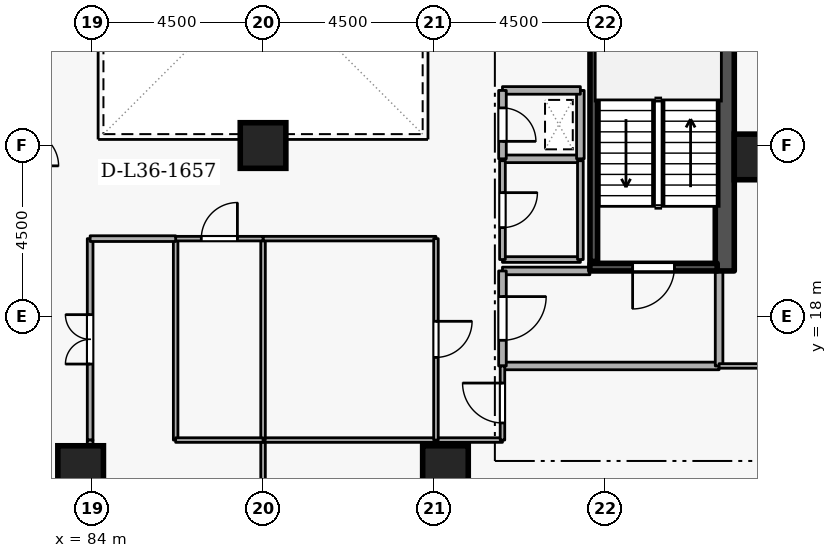
"""IFC4 building model, lengths in metres.
Left out: names, types, materials, properties, quantities, classifications, styles, units other than length and angle.
Written with IfcOpenShell. Run it as: python <this file> out.ifc"""

import sys

from ifc_helpers import new_model, si_unit, direction, frame, frame_2d, origin, origin_2d, place, context, subcontext, project, spatial, rectangle, extrude, element, fill, save


model = new_model("IFC4")
c1 = context("Model", 3, precision=1e-05, world=origin(), true_north=direction((0.0, 1.0)))
c2 = subcontext(c1, "Body", "Model", "MODEL_VIEW")
j1 = project(units=[si_unit("LENGTHUNIT", "METRE"), si_unit("PLANEANGLEUNIT", "RADIAN")], contexts=[c1])
p1 = place(None, origin())
s1 = spatial("IfcSite", under=j1, at=p1, CompositionType="ELEMENT")
p2 = place(p1, origin())
s2 = spatial("IfcBuilding", under=s1, at=p2, CompositionType="ELEMENT")
p3 = place(p2, frame((0.0, 0.0, 137.7)))
s3 = spatial("IfcBuildingStorey", under=s2, at=p3, CompositionType="ELEMENT", Elevation=137.7)
p4 = place(p3, frame((100.65, 19.2, 0.0), z_axis=(0.0, 0.0, 1.0), x_axis=(0.0, 1.0, 0.0)))
e1 = element("IfcWall", 1, at=p4, inside=s3, PredefinedType="SHEAR", context=c2, shape_type="SweptSolid", body=[
    extrude(rectangle(XDim=15.6, YDim=0.5, at=frame_2d((7.8, 0.0))), origin(), (0.0, 0.0, 1.0), 3.6),
])
for number, where, z_axis, x_axis in (
    (2, (93.3, 14.0, 0.0), (0.0, 0.0, 1.0), (1.0, 0.0, 0.0)),
    (3, (83.7, 14.0, 0.0), (0.0, 0.0, 1.0), (1.0, 0.0, 0.0)),
    (4, (101.5, 22.2, 0.0), (0.0, 0.0, 1.0), (1.0, 0.0, 0.0)),
    (5, (88.5, 22.5, 0.0), (0.0, 0.0, 1.0), (1.0, 0.0, 0.0)),
):
    element("IfcColumn", number, at=place(p3, frame(where, z_axis=z_axis, x_axis=x_axis)), inside=s3, PredefinedType="COLUMN", context=c2, shape_type="SweptSolid", body=[
        extrude(rectangle(XDim=1.2, YDim=1.2, at=origin_2d()), origin(), (0.0, 0.0, 1.0), 3.6),
    ])
p5 = place(p3, frame((100.45, 19.3, 0.0), z_axis=(0.0, 0.0, 1.0), x_axis=(-1.0, 0.0, 0.0)))
e6 = element("IfcWall", 6, at=p5, inside=s3, PredefinedType="SHEAR", context=c2, shape_type="SweptSolid", body=[
    extrude(rectangle(XDim=3.35, YDim=0.2, at=frame_2d((1.675, 0.0))), origin(), (0.0, 0.0, 1.0), 3.6),
])
p6 = place(p5, frame((1.125, 0.0, 0.0)))
e7 = element("IfcOpeningElement", 7, at=p6, cuts=e6, PredefinedType="OPENING", context=c2, shape_type="SweptSolid", body=[
    extrude(rectangle(XDim=1.1, YDim=2.1, at=frame_2d((0.55, 1.05))), frame((0.0, 0.11, 0.0), z_axis=(0.0, -1.0, 0.0), x_axis=(1.0, 0.0, 0.0)), (0.0, 0.0, 1.0), 0.22),
])
p7 = place(p3, frame((97.203, 26.55, 0.0), z_axis=(0.0, 0.0, 1.0), x_axis=(0.0, -1.0, 0.0)))
e8 = element("IfcWall", 8, at=p7, inside=s3, PredefinedType="SHEAR", context=c2, shape_type="SweptSolid", body=[
    extrude(rectangle(XDim=7.1, YDim=0.2, at=frame_2d((3.55, 0.0))), origin(), (0.0, 0.0, 1.0), 3.6),
])
p8 = place(p3, frame((94.8, 16.7, 0.0), z_axis=(0.0, 0.0, 1.0), x_axis=(1.0, 0.0, 0.0)))
e9 = element("IfcWall", 9, at=p8, inside=s3, PredefinedType="STANDARD", context=c2, shape_type="SweptSolid", body=[
    extrude(rectangle(XDim=5.7, YDim=0.2, at=frame_2d((2.85, 0.0))), origin(), (0.0, 0.0, 1.0), 3.26),
])
p9 = place(p3, frame((100.5, 16.7, 0.0), z_axis=(0.0, 0.0, 1.0), x_axis=(0.0, 1.0, 0.0)))
e10 = element("IfcWall", 10, at=p9, inside=s3, PredefinedType="STANDARD", context=c2, shape_type="SweptSolid", body=[
    extrude(rectangle(XDim=2.5, YDim=0.2, at=frame_2d((1.25, 0.0))), origin(), (0.0, 0.0, 1.0), 3.26),
])
p10 = place(p3, frame((97.1, 19.2, 0.0), z_axis=(0.0, 0.0, 1.0), x_axis=(-1.0, 0.0, 0.0)))
e11 = element("IfcWall", 11, at=p10, inside=s3, PredefinedType="STANDARD", context=c2, shape_type="SweptSolid", body=[
    extrude(rectangle(XDim=2.3, YDim=0.2, at=frame_2d((1.15, 0.0))), origin(), (0.0, 0.0, 1.0), 2.465),
])
p11 = place(p3, frame((94.8, 19.2, 0.0), z_axis=(0.0, 0.0, 1.0), x_axis=(0.0, -1.0, 0.0)))
e12 = element("IfcWall", 12, at=p11, inside=s3, PredefinedType="STANDARD", context=c2, shape_type="SweptSolid", body=[
    extrude(rectangle(XDim=2.5, YDim=0.2, at=frame_2d((1.25, 0.0))), origin(), (0.0, 0.0, 1.0), 3.26),
])
p12 = place(p11, frame((0.675, 0.0, 0.0)))
e13 = element("IfcOpeningElement", 13, at=p12, cuts=e12, PredefinedType="OPENING", context=c2, shape_type="SweptSolid", body=[
    extrude(rectangle(XDim=1.15, YDim=2.1, at=frame_2d((0.575, 1.05))), frame((0.0, 0.11, 0.0), z_axis=(0.0, -1.0, 0.0), x_axis=(1.0, 0.0, 0.0)), (0.0, 0.0, 1.0), 0.22),
])
p13 = place(p3, frame((94.8, 22.15, 0.0), z_axis=(0.0, 0.0, 1.0), x_axis=(1.0, 0.0, 0.0)))
e14 = element("IfcWall", 14, at=p13, inside=s3, PredefinedType="STANDARD", context=c2, shape_type="SweptSolid", body=[
    extrude(rectangle(XDim=2.05, YDim=0.2, at=frame_2d((1.025, 0.0))), origin(), (0.0, 0.0, 1.0), 3.26),
])
p14 = place(p3, frame((96.85, 22.15, 0.0), z_axis=(0.0, 0.0, 1.0), x_axis=(0.0, 1.0, 0.0)))
e15 = element("IfcWall", 15, at=p14, inside=s3, PredefinedType="STANDARD", context=c2, shape_type="SweptSolid", body=[
    extrude(rectangle(XDim=1.8, YDim=0.2, at=frame_2d((0.9, 0.0))), origin(), (0.0, 0.0, 1.0), 3.26),
])
p15 = place(p3, frame((96.85, 23.95, 0.0), z_axis=(0.0, 0.0, 1.0), x_axis=(-1.0, 0.0, 0.0)))
e16 = element("IfcWall", 16, at=p15, inside=s3, PredefinedType="STANDARD", context=c2, shape_type="SweptSolid", body=[
    extrude(rectangle(XDim=2.05, YDim=0.2, at=frame_2d((1.025, 0.0))), origin(), (0.0, 0.0, 1.0), 3.26),
])
p16 = place(p3, frame((94.8, 23.95, 0.0), z_axis=(0.0, 0.0, 1.0), x_axis=(0.0, -1.0, 0.0)))
e17 = element("IfcWall", 17, at=p16, inside=s3, PredefinedType="STANDARD", context=c2, shape_type="SweptSolid", body=[
    extrude(rectangle(XDim=1.8, YDim=0.2, at=frame_2d((0.9, 0.0))), origin(), (0.0, 0.0, 1.0), 3.26),
])
p17 = place(p16, frame((0.46, 0.0, 0.0)))
e18 = element("IfcOpeningElement", 18, at=p17, cuts=e17, PredefinedType="OPENING", context=c2, shape_type="SweptSolid", body=[
    extrude(rectangle(XDim=0.88, YDim=2.04, at=frame_2d((0.44, 1.02))), frame((0.0, 0.11, 0.0), z_axis=(0.0, -1.0, 0.0), x_axis=(1.0, 0.0, 0.0)), (0.0, 0.0, 1.0), 0.22),
])
p18 = place(p3, frame((94.8, 19.5, 0.0), z_axis=(0.0, 0.0, 1.0), x_axis=(1.0, 0.0, 0.0)))
e19 = element("IfcWall", 19, at=p18, inside=s3, PredefinedType="PARTITIONING", context=c2, shape_type="SweptSolid", body=[
    extrude(rectangle(XDim=2.05, YDim=0.15, at=frame_2d((1.025, 0.0))), origin(), (0.0, 0.0, 1.0), 2.465),
])
p19 = place(p3, frame((96.85, 19.5, 0.0), z_axis=(0.0, 0.0, 1.0), x_axis=(0.0, 1.0, 0.0)))
e20 = element("IfcWall", 20, at=p19, inside=s3, PredefinedType="PARTITIONING", context=c2, shape_type="SweptSolid", body=[
    extrude(rectangle(XDim=2.6, YDim=0.15, at=frame_2d((1.3, 0.0))), origin(), (0.0, 0.0, 1.0), 3.26),
])
p20 = place(p3, frame((94.8, 22.1, 0.0), z_axis=(0.0, 0.0, 1.0), x_axis=(0.0, -1.0, 0.0)))
e21 = element("IfcWall", 21, at=p20, inside=s3, PredefinedType="PARTITIONING", context=c2, shape_type="SweptSolid", body=[
    extrude(rectangle(XDim=2.6, YDim=0.15, at=frame_2d((1.3, 0.0))), origin(), (0.0, 0.0, 1.0), 3.26),
])
p21 = place(p20, frame((0.84, 0.0, 0.0)))
e22 = element("IfcOpeningElement", 22, at=p21, cuts=e21, PredefinedType="OPENING", context=c2, shape_type="SweptSolid", body=[
    extrude(rectangle(XDim=0.92, YDim=2.08, at=frame_2d((0.46, 1.04))), frame((0.0, 0.085, 0.0), z_axis=(0.0, -1.0, 0.0), x_axis=(1.0, 0.0, 0.0)), (0.0, 0.0, 1.0), 0.17),
])
p22 = place(p3, frame((88.5, 3.28, 0.0), z_axis=(0.0, 0.0, 1.0), x_axis=(0.0, 1.0, 0.0)))
e23 = element("IfcWall", 23, at=p22, inside=s3, PredefinedType="PARTITIONING", context=c2, shape_type="SweptSolid", body=[
    extrude(rectangle(XDim=11.47, YDim=0.12, at=frame_2d((5.735, 0.0))), origin(), (0.0, 0.0, 1.0), 2.802),
])
p23 = place(p3, frame((88.5, 14.75, 0.0), z_axis=(0.0, 0.0, 1.0), x_axis=(1.0, 0.0, 0.0)))
e24 = element("IfcWall", 24, at=p23, inside=s3, PredefinedType="PARTITIONING", context=c2, shape_type="SweptSolid", body=[
    extrude(rectangle(XDim=4.55, YDim=0.12, at=frame_2d((2.275, 0.0))), origin(), (0.0, 0.0, 1.0), 3.26),
])
p24 = place(p3, frame((93.05, 14.75, 0.0), z_axis=(0.0, 0.0, 1.0), x_axis=(1.0, 0.0, 0.0)))
e25 = element("IfcWall", 25, at=p24, inside=s3, PredefinedType="PARTITIONING", context=c2, shape_type="SweptSolid", body=[
    extrude(rectangle(XDim=1.75, YDim=0.12, at=frame_2d((0.875, 0.0))), origin(), (0.0, 0.0, 1.0), 3.26),
])
p25 = place(p3, frame((94.8, 14.75, 0.0), z_axis=(0.0, 0.0, 1.0), x_axis=(0.0, 1.0, 0.0)))
e26 = element("IfcWall", 26, at=p25, inside=s3, PredefinedType="PARTITIONING", context=c2, shape_type="SweptSolid", body=[
    extrude(rectangle(XDim=1.95, YDim=0.12, at=frame_2d((0.975, 0.0))), origin(), (0.0, 0.0, 1.0), 3.26),
])
p26 = place(p25, frame((0.45, 0.0, 0.0)))
e27 = element("IfcOpeningElement", 27, at=p26, cuts=e26, PredefinedType="OPENING", context=c2, shape_type="SweptSolid", body=[
    extrude(rectangle(XDim=1.05, YDim=2.1, at=frame_2d((0.525, 1.05))), frame((0.0, 0.07, 0.0), z_axis=(0.0, -1.0, 0.0), x_axis=(1.0, 0.0, 0.0)), (0.0, 0.0, 1.0), 0.14),
])
p27 = place(p3, frame((100.5, 16.7, 0.0), z_axis=(0.0, 0.0, 1.0), x_axis=(1.0, 0.0, 0.0)))
e28 = element("IfcWall", 28, at=p27, inside=s3, PredefinedType="PARTITIONING", context=c2, shape_type="SweptSolid", body=[
    extrude(rectangle(XDim=11.72, YDim=0.12, at=frame_2d((5.86, 0.0))), origin(), (0.0, 0.0, 1.0), 3.26),
])
p28 = place(p3, frame((88.5, 14.75, 0.0), z_axis=(0.0, 0.0, 1.0), x_axis=(0.0, 1.0, 0.0)))
e29 = element("IfcWall", 29, at=p28, inside=s3, PredefinedType="PARTITIONING", context=c2, shape_type="SweptSolid", body=[
    extrude(rectangle(XDim=5.3, YDim=0.12, at=frame_2d((2.65, 0.0))), origin(), (0.0, 0.0, 1.0), 3.26),
])
p29 = place(p3, frame((88.5, 20.05, 0.0), z_axis=(0.0, 0.0, 1.0), x_axis=(1.0, 0.0, 0.0)))
e30 = element("IfcWall", 30, at=p29, inside=s3, PredefinedType="PARTITIONING", context=c2, shape_type="SweptSolid", body=[
    extrude(rectangle(XDim=4.55, YDim=0.12, at=frame_2d((2.275, 0.0))), origin(), (0.0, 0.0, 1.0), 3.26),
])
p30 = place(p3, frame((93.05, 20.05, 0.0), z_axis=(0.0, 0.0, 1.0), x_axis=(0.0, -1.0, 0.0)))
e31 = element("IfcWall", 31, at=p30, inside=s3, PredefinedType="PARTITIONING", context=c2, shape_type="SweptSolid", body=[
    extrude(rectangle(XDim=5.3, YDim=0.12, at=frame_2d((2.65, 0.0))), origin(), (0.0, 0.0, 1.0), 3.26),
])
p31 = place(p30, frame((2.175, 0.0, 0.0)))
e32 = element("IfcOpeningElement", 32, at=p31, cuts=e31, PredefinedType="OPENING", context=c2, shape_type="SweptSolid", body=[
    extrude(rectangle(XDim=0.95, YDim=2.1, at=frame_2d((0.475, 1.05))), frame((0.0, 0.07, 0.0), z_axis=(0.0, -1.0, 0.0), x_axis=(1.0, 0.0, 0.0)), (0.0, 0.0, 1.0), 0.14),
])
p32 = place(p3, frame((86.2, 14.75, 0.0), z_axis=(0.0, 0.0, 1.0), x_axis=(0.0, 1.0, 0.0)))
e33 = element("IfcWall", 33, at=p32, inside=s3, PredefinedType="PARTITIONING", context=c2, shape_type="SweptSolid", body=[
    extrude(rectangle(XDim=5.3, YDim=0.12, at=frame_2d((2.65, 0.0))), origin(), (0.0, 0.0, 1.0), 3.26),
])
p33 = place(p3, frame((86.2, 20.05, 0.0), z_axis=(0.0, 0.0, 1.0), x_axis=(1.0, 0.0, 0.0)))
e34 = element("IfcWall", 34, at=p33, inside=s3, PredefinedType="PARTITIONING", context=c2, shape_type="SweptSolid", body=[
    extrude(rectangle(XDim=2.3, YDim=0.12, at=frame_2d((1.15, 0.0))), origin(), (0.0, 0.0, 1.0), 3.26),
])
p34 = place(p33, frame((0.675, 0.0, 0.0)))
e35 = element("IfcOpeningElement", 35, at=p34, cuts=e34, PredefinedType="OPENING", context=c2, shape_type="SweptSolid", body=[
    extrude(rectangle(XDim=0.95, YDim=2.1, at=frame_2d((0.475, 1.05))), frame((0.0, 0.07, 0.0), z_axis=(0.0, -1.0, 0.0), x_axis=(1.0, 0.0, 0.0)), (0.0, 0.0, 1.0), 0.14),
])
p35 = place(p3, frame((88.5, 14.75, 0.0), z_axis=(0.0, 0.0, 1.0), x_axis=(-1.0, 0.0, 0.0)))
e36 = element("IfcWall", 36, at=p35, inside=s3, PredefinedType="PARTITIONING", context=c2, shape_type="SweptSolid", body=[
    extrude(rectangle(XDim=2.3, YDim=0.12, at=frame_2d((1.15, 0.0))), origin(), (0.0, 0.0, 1.0), 3.26),
])
p36 = place(p3, frame((83.95, 14.75, 0.0), z_axis=(0.0, 0.0, 1.0), x_axis=(0.0, 1.0, 0.0)))
e37 = element("IfcWall", 37, at=p36, inside=s3, PredefinedType="PARTITIONING", context=c2, shape_type="SweptSolid", body=[
    extrude(rectangle(XDim=5.3, YDim=0.15, at=frame_2d((2.65, 0.0))), origin(), (0.0, 0.0, 1.0), 3.26),
])
p37 = place(p36, frame((2.0, 0.0, 0.0)))
e38 = element("IfcOpeningElement", 38, at=p37, cuts=e37, PredefinedType="OPENING", context=c2, shape_type="SweptSolid", body=[
    extrude(rectangle(XDim=1.3, YDim=2.12, at=frame_2d((0.65, 1.06))), frame((0.0, 0.085, 0.0), z_axis=(0.0, -1.0, 0.0), x_axis=(1.0, 0.0, 0.0)), (0.0, 0.0, 1.0), 0.17),
])
p38 = place(p3, frame((83.95, 20.05, 0.0), z_axis=(0.0, 0.0, 1.0), x_axis=(1.0, 0.0, 0.0)))
e39 = element("IfcWall", 39, at=p38, inside=s3, PredefinedType="PARTITIONING", context=c2, shape_type="SweptSolid", body=[
    extrude(rectangle(XDim=2.25, YDim=0.15, at=frame_2d((1.125, 0.0))), origin(), (0.0, 0.0, 1.0), 3.26),
])
p39 = place(p3, frame((83.95, 12.4, 0.0), z_axis=(0.0, 0.0, 1.0), x_axis=(0.0, 1.0, 0.0)))
e40 = element("IfcWall", 40, at=p39, inside=s3, PredefinedType="PARTITIONING", context=c2, shape_type="SweptSolid", body=[
    extrude(rectangle(XDim=2.35, YDim=0.15, at=frame_2d((1.175, 0.0))), origin(), (0.0, 0.0, 1.0), 3.26),
])
p40 = place(p6, origin())
e41 = element("IfcDoor", 41, at=p40, inside=s3, OperationType="SINGLE_SWING_RIGHT", PredefinedType="DOOR", context=c2, shape_type="SweptSolid", body=[
    extrude(rectangle(XDim=1.1, YDim=2.1, at=frame_2d((0.55, 1.05))), frame((0.0, 0.025, 0.0), z_axis=(0.0, -1.0, 0.0), x_axis=(1.0, 0.0, 0.0)), (0.0, 0.0, 1.0), 0.05),
])
fill(e7, e41)
p41 = place(p12, origin())
e42 = element("IfcDoor", 42, at=p41, inside=s3, OperationType="SINGLE_SWING_LEFT", PredefinedType="DOOR", context=c2, shape_type="SweptSolid", body=[
    extrude(rectangle(XDim=1.15, YDim=2.1, at=frame_2d((0.575, 1.05))), frame((0.0, 0.025, 0.0), z_axis=(0.0, -1.0, 0.0), x_axis=(1.0, 0.0, 0.0)), (0.0, 0.0, 1.0), 0.05),
])
fill(e13, e42)
p42 = place(p17, origin())
e43 = element("IfcDoor", 43, at=p42, inside=s3, OperationType="SINGLE_SWING_RIGHT", PredefinedType="DOOR", context=c2, shape_type="SweptSolid", body=[
    extrude(rectangle(XDim=0.88, YDim=2.04, at=frame_2d((0.44, 1.02))), frame((0.0, 0.025, 0.0), z_axis=(0.0, -1.0, 0.0), x_axis=(1.0, 0.0, 0.0)), (0.0, 0.0, 1.0), 0.05),
])
fill(e18, e43)
p43 = place(p21, origin())
e44 = element("IfcDoor", 44, at=p43, inside=s3, OperationType="SINGLE_SWING_LEFT", PredefinedType="DOOR", context=c2, shape_type="SweptSolid", body=[
    extrude(rectangle(XDim=0.92, YDim=2.08, at=frame_2d((0.46, 1.04))), frame((0.0, 0.025, 0.0), z_axis=(0.0, -1.0, 0.0), x_axis=(1.0, 0.0, 0.0)), (0.0, 0.0, 1.0), 0.05),
])
fill(e22, e44)
p44 = place(p26, origin())
e45 = element("IfcDoor", 45, at=p44, inside=s3, OperationType="SINGLE_SWING_RIGHT", PredefinedType="DOOR", context=c2, shape_type="SweptSolid", body=[
    extrude(rectangle(XDim=1.05, YDim=2.1, at=frame_2d((0.525, 1.05))), frame((0.0, 0.025, 0.0), z_axis=(0.0, -1.0, 0.0), x_axis=(1.0, 0.0, 0.0)), (0.0, 0.0, 1.0), 0.05),
])
fill(e27, e45)
p45 = place(p31, origin())
e46 = element("IfcDoor", 46, at=p45, inside=s3, OperationType="SINGLE_SWING_LEFT", PredefinedType="DOOR", context=c2, shape_type="SweptSolid", body=[
    extrude(rectangle(XDim=0.95, YDim=2.1, at=frame_2d((0.475, 1.05))), frame((0.0, 0.025, 0.0), z_axis=(0.0, -1.0, 0.0), x_axis=(1.0, 0.0, 0.0)), (0.0, 0.0, 1.0), 0.05),
])
fill(e32, e46)
p46 = place(p34, origin())
e47 = element("IfcDoor", 47, at=p46, inside=s3, OperationType="SINGLE_SWING_RIGHT", PredefinedType="DOOR", context=c2, shape_type="SweptSolid", body=[
    extrude(rectangle(XDim=0.95, YDim=2.1, at=frame_2d((0.475, 1.05))), frame((0.0, 0.025, 0.0), z_axis=(0.0, -1.0, 0.0), x_axis=(1.0, 0.0, 0.0)), (0.0, 0.0, 1.0), 0.05),
])
fill(e35, e47)
p47 = place(p37, origin())
e48 = element("IfcDoor", 48, at=p47, inside=s3, OperationType="DOUBLE_DOOR_SINGLE_SWING", PredefinedType="DOOR", context=c2, shape_type="SweptSolid", body=[
    extrude(rectangle(XDim=1.3, YDim=2.12, at=frame_2d((0.65, 1.06))), frame((0.0, 0.025, 0.0), z_axis=(0.0, -1.0, 0.0), x_axis=(1.0, 0.0, 0.0)), (0.0, 0.0, 1.0), 0.05),
])
fill(e38, e48)
save(model, sys.argv[1])
